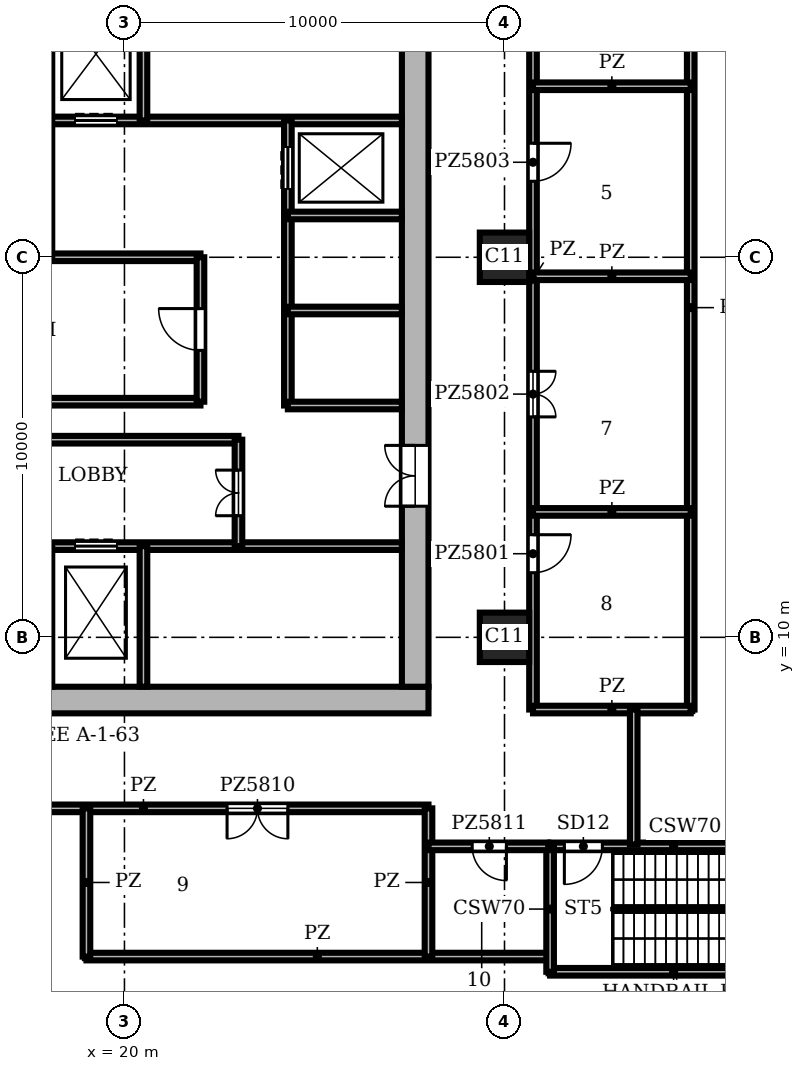
"""IFC4 building model, lengths in metres.
Left out: names, types, materials, properties, quantities, classifications, styles, units other than length and angle.
Written with IfcOpenShell. Run it as: python <this file> out.ifc"""

import sys

from ifc_helpers import new_model, si_unit, direction, frame, frame_2d, origin, origin_2d, place, context, subcontext, project, spatial, rectangle, extrude, element, fill, save


model = new_model("IFC4")
c1 = context("Model", 3, precision=1e-05, world=origin(), true_north=direction((0.0, 1.0)))
c2 = subcontext(c1, "Body", "Model", "MODEL_VIEW")
j1 = project(units=[si_unit("LENGTHUNIT", "METRE"), si_unit("PLANEANGLEUNIT", "RADIAN")], contexts=[c1])
p1 = place(None, origin())
s1 = spatial("IfcSite", under=j1, at=p1, CompositionType="ELEMENT")
p2 = place(p1, origin())
s2 = spatial("IfcBuilding", under=s1, at=p2, CompositionType="ELEMENT")
p3 = place(p2, frame((0.0, 0.0, 237.0)))
s3 = spatial("IfcBuildingStorey", under=s2, at=p3, CompositionType="ELEMENT", Elevation=237.0)
for number, where, z_axis, x_axis in (
    (1, (30.0, 10.0, 0.0), (0.0, 0.0, 1.0), (1.0, 0.0, 0.0)),
    (2, (30.0, 20.0, 0.0), (0.0, 0.0, 1.0), (1.0, 0.0, 0.0)),
):
    element("IfcColumn", number, at=place(p3, frame(where, z_axis=z_axis, x_axis=x_axis)), inside=s3, PredefinedType="COLUMN", context=c2, shape_type="SweptSolid", body=[
        extrude(rectangle(XDim=1.3, YDim=1.3, at=origin_2d()), origin(), (0.0, 0.0, 1.0), 9.0),
    ])
p4 = place(p3, frame((8.0, 8.35, 0.0), z_axis=(0.0, 0.0, 1.0), x_axis=(1.0, 0.0, 0.0)))
e3 = element("IfcWall", 3, at=p4, inside=s3, PredefinedType="SHEAR", context=c2, shape_type="SweptSolid", body=[
    extrude(rectangle(XDim=20.0, YDim=0.7, at=frame_2d((10.0, 0.0))), origin(), (0.0, 0.0, 1.0), 9.0),
])
p5 = place(p3, frame((27.65, 8.7, 0.0), z_axis=(0.0, 0.0, 1.0), x_axis=(0.0, 1.0, 0.0)))
e4 = element("IfcWall", 4, at=p5, inside=s3, PredefinedType="SHEAR", context=c2, shape_type="SweptSolid", body=[
    extrude(rectangle(XDim=18.6, YDim=0.7, at=frame_2d((9.3, 0.0))), origin(), (0.0, 0.0, 1.0), 9.0),
])
p6 = place(p5, frame((4.75, 0.0, 0.0)))
e5 = element("IfcOpeningElement", 5, at=p6, cuts=e4, PredefinedType="OPENING", context=c2, shape_type="SweptSolid", body=[
    extrude(rectangle(XDim=1.6, YDim=2.1, at=frame_2d((0.8, 1.05))), frame((0.0, 0.36, 0.0), z_axis=(0.0, -1.0, 0.0), x_axis=(1.0, 0.0, 0.0)), (0.0, 0.0, 1.0), 0.72),
])
p7 = place(p3, frame((31.2, 1.2, 0.0), z_axis=(0.0, 0.0, 1.0), x_axis=(1.0, 0.0, 0.0)))
e6 = element("IfcWall", 6, at=p7, inside=s3, PredefinedType="SHEAR", context=c2, shape_type="SweptSolid", body=[
    extrude(rectangle(XDim=6.5, YDim=0.2, at=frame_2d((3.25, 0.0))), origin(), (0.0, 0.0, 1.0), 8.55),
])
p8 = place(p3, frame((31.2, 4.5, 0.0), z_axis=(0.0, 0.0, 1.0), x_axis=(1.0, 0.0, 0.0)))
e7 = element("IfcWall", 7, at=p8, inside=s3, PredefinedType="SHEAR", context=c2, shape_type="SweptSolid", body=[
    extrude(rectangle(XDim=6.5, YDim=0.2, at=frame_2d((3.25, 0.0))), origin(), (0.0, 0.0, 1.0), 8.55),
])
p9 = place(p8, frame((0.375, 0.0, 0.0)))
e8 = element("IfcOpeningElement", 8, at=p9, cuts=e7, PredefinedType="OPENING", context=c2, shape_type="SweptSolid", body=[
    extrude(rectangle(XDim=1.0, YDim=2.1, at=frame_2d((0.5, 1.05))), frame((0.0, 0.11, 0.0), z_axis=(0.0, -1.0, 0.0), x_axis=(1.0, 0.0, 0.0)), (0.0, 0.0, 1.0), 0.22),
])
p10 = place(p3, frame((13.8, 12.4, 0.0), z_axis=(0.0, 0.0, 1.0), x_axis=(1.0, 0.0, 0.0)))
e9 = element("IfcWall", 9, at=p10, inside=s3, PredefinedType="SHEAR", context=c2, shape_type="SweptSolid", body=[
    extrude(rectangle(XDim=13.5, YDim=0.2, at=frame_2d((6.75, 0.0))), origin(), (0.0, 0.0, 1.0), 8.55),
])
p11 = place(p10, frame((2.4, 0.0, 0.0)))
e10 = element("IfcOpeningElement", 10, at=p11, cuts=e9, PredefinedType="OPENING", context=c2, shape_type="SweptSolid", body=[
    extrude(rectangle(XDim=1.1, YDim=2.1, at=frame_2d((0.55, 1.05))), frame((0.0, 0.11, 0.0), z_axis=(0.0, -1.0, 0.0), x_axis=(1.0, 0.0, 0.0)), (0.0, 0.0, 1.0), 0.22),
])
p12 = place(p10, frame((4.9, 0.0, 0.0)))
e11 = element("IfcOpeningElement", 11, at=p12, cuts=e9, PredefinedType="OPENING", context=c2, shape_type="SweptSolid", body=[
    extrude(rectangle(XDim=1.1, YDim=2.1, at=frame_2d((0.55, 1.05))), frame((0.0, 0.11, 0.0), z_axis=(0.0, -1.0, 0.0), x_axis=(1.0, 0.0, 0.0)), (0.0, 0.0, 1.0), 0.22),
])
p13 = place(p10, frame((0.2, 0.0, 0.0)))
e12 = element("IfcOpeningElement", 12, at=p13, cuts=e9, PredefinedType="OPENING", context=c2, shape_type="SweptSolid", body=[
    extrude(rectangle(XDim=1.0, YDim=2.1, at=frame_2d((0.5, 1.05))), frame((0.0, 0.11, 0.0), z_axis=(0.0, -1.0, 0.0), x_axis=(1.0, 0.0, 0.0)), (0.0, 0.0, 1.0), 0.22),
])
p14 = place(p3, frame((13.3, 15.2, 0.0), z_axis=(0.0, 0.0, 1.0), x_axis=(1.0, 0.0, 0.0)))
e13 = element("IfcWall", 13, at=p14, inside=s3, PredefinedType="SHEAR", context=c2, shape_type="SweptSolid", body=[
    extrude(rectangle(XDim=9.7, YDim=0.2, at=frame_2d((4.85, 0.0))), origin(), (0.0, 0.0, 1.0), 8.55),
])
p15 = place(p3, frame((24.3, 16.1, 0.0), z_axis=(0.0, 0.0, 1.0), x_axis=(1.0, 0.0, 0.0)))
e14 = element("IfcWall", 14, at=p15, inside=s3, PredefinedType="SHEAR", context=c2, shape_type="SweptSolid", body=[
    extrude(rectangle(XDim=3.0, YDim=0.2, at=frame_2d((1.5, 0.0))), origin(), (0.0, 0.0, 1.0), 8.55),
])
p16 = place(p3, frame((14.0, 16.2, 0.0), z_axis=(0.0, 0.0, 1.0), x_axis=(1.0, 0.0, 0.0)))
e15 = element("IfcWall", 15, at=p16, inside=s3, PredefinedType="SHEAR", context=c2, shape_type="SweptSolid", body=[
    extrude(rectangle(XDim=8.0, YDim=0.2, at=frame_2d((4.0, 0.0))), origin(), (0.0, 0.0, 1.0), 8.55),
])
p17 = place(p3, frame((24.3, 18.6, 0.0), z_axis=(0.0, 0.0, 1.0), x_axis=(1.0, 0.0, 0.0)))
e16 = element("IfcWall", 16, at=p17, inside=s3, PredefinedType="SHEAR", context=c2, shape_type="SweptSolid", body=[
    extrude(rectangle(XDim=3.0, YDim=0.2, at=frame_2d((1.5, 0.0))), origin(), (0.0, 0.0, 1.0), 8.55),
])
p18 = place(p3, frame((13.3, 20.0, 0.0), z_axis=(0.0, 0.0, 1.0), x_axis=(1.0, 0.0, 0.0)))
e17 = element("IfcWall", 17, at=p18, inside=s3, PredefinedType="SHEAR", context=c2, shape_type="SweptSolid", body=[
    extrude(rectangle(XDim=8.7, YDim=0.2, at=frame_2d((4.35, 0.0))), origin(), (0.0, 0.0, 1.0), 8.55),
])
p19 = place(p3, frame((24.3, 21.1, 0.0), z_axis=(0.0, 0.0, 1.0), x_axis=(1.0, 0.0, 0.0)))
e18 = element("IfcWall", 18, at=p19, inside=s3, PredefinedType="SHEAR", context=c2, shape_type="SweptSolid", body=[
    extrude(rectangle(XDim=3.0, YDim=0.2, at=frame_2d((1.5, 0.0))), origin(), (0.0, 0.0, 1.0), 8.55),
])
p20 = place(p3, frame((13.8, 23.6, 0.0), z_axis=(0.0, 0.0, 1.0), x_axis=(1.0, 0.0, 0.0)))
e19 = element("IfcWall", 19, at=p20, inside=s3, PredefinedType="SHEAR", context=c2, shape_type="SweptSolid", body=[
    extrude(rectangle(XDim=13.5, YDim=0.2, at=frame_2d((6.75, 0.0))), origin(), (0.0, 0.0, 1.0), 8.55),
])
p21 = place(p20, frame((2.4, 0.0, 0.0)))
e20 = element("IfcOpeningElement", 20, at=p21, cuts=e19, PredefinedType="OPENING", context=c2, shape_type="SweptSolid", body=[
    extrude(rectangle(XDim=1.1, YDim=2.1, at=frame_2d((0.55, 1.05))), frame((0.0, 0.11, 0.0), z_axis=(0.0, -1.0, 0.0), x_axis=(1.0, 0.0, 0.0)), (0.0, 0.0, 1.0), 0.22),
])
p22 = place(p20, frame((4.9, 0.0, 0.0)))
e21 = element("IfcOpeningElement", 21, at=p22, cuts=e19, PredefinedType="OPENING", context=c2, shape_type="SweptSolid", body=[
    extrude(rectangle(XDim=1.1, YDim=2.1, at=frame_2d((0.55, 1.05))), frame((0.0, 0.11, 0.0), z_axis=(0.0, -1.0, 0.0), x_axis=(1.0, 0.0, 0.0)), (0.0, 0.0, 1.0), 0.22),
])
p23 = place(p20, frame((0.2, 0.0, 0.0)))
e22 = element("IfcOpeningElement", 22, at=p23, cuts=e19, PredefinedType="OPENING", context=c2, shape_type="SweptSolid", body=[
    extrude(rectangle(XDim=1.0, YDim=2.1, at=frame_2d((0.5, 1.05))), frame((0.0, 0.11, 0.0), z_axis=(0.0, -1.0, 0.0), x_axis=(1.0, 0.0, 0.0)), (0.0, 0.0, 1.0), 0.22),
])
for number, where, z_axis, x_axis in (
    (23, (20.5, 8.7, 0.0), (0.0, 0.0, 1.0), (0.0, 1.0, 0.0)),
    (24, (20.5, 23.6, 0.0), (0.0, 0.0, 1.0), (0.0, 1.0, 0.0)),
):
    element("IfcWall", number, at=place(p3, frame(where, z_axis=z_axis, x_axis=x_axis)), inside=s3, PredefinedType="SHEAR", context=c2, shape_type="SweptSolid", body=[
        extrude(rectangle(XDim=3.7, YDim=0.2, at=frame_2d((1.85, 0.0))), origin(), (0.0, 0.0, 1.0), 8.55),
    ])
p24 = place(p3, frame((22.0, 16.2, 0.0), z_axis=(0.0, 0.0, 1.0), x_axis=(0.0, 1.0, 0.0)))
e25 = element("IfcWall", 25, at=p24, inside=s3, PredefinedType="SHEAR", context=c2, shape_type="SweptSolid", body=[
    extrude(rectangle(XDim=3.8, YDim=0.2, at=frame_2d((1.9, 0.0))), origin(), (0.0, 0.0, 1.0), 8.55),
])
p25 = place(p24, frame((1.35, 0.0, 0.0)))
e26 = element("IfcOpeningElement", 26, at=p25, cuts=e25, PredefinedType="OPENING", context=c2, shape_type="SweptSolid", body=[
    extrude(rectangle(XDim=1.1, YDim=2.1, at=frame_2d((0.55, 1.05))), frame((0.0, 0.11, 0.0), z_axis=(0.0, -1.0, 0.0), x_axis=(1.0, 0.0, 0.0)), (0.0, 0.0, 1.0), 0.22),
])
p26 = place(p3, frame((23.0, 12.4, 0.0), z_axis=(0.0, 0.0, 1.0), x_axis=(0.0, 1.0, 0.0)))
e27 = element("IfcWall", 27, at=p26, inside=s3, PredefinedType="SHEAR", context=c2, shape_type="SweptSolid", body=[
    extrude(rectangle(XDim=2.8, YDim=0.2, at=frame_2d((1.4, 0.0))), origin(), (0.0, 0.0, 1.0), 8.55),
])
p27 = place(p26, frame((0.8, 0.0, 0.0)))
e28 = element("IfcOpeningElement", 28, at=p27, cuts=e27, PredefinedType="OPENING", context=c2, shape_type="SweptSolid", body=[
    extrude(rectangle(XDim=1.2, YDim=2.1, at=frame_2d((0.6, 1.05))), frame((0.0, 0.11, 0.0), z_axis=(0.0, -1.0, 0.0), x_axis=(1.0, 0.0, 0.0)), (0.0, 0.0, 1.0), 0.22),
])
p28 = place(p3, frame((24.3, 16.1, 0.0), z_axis=(0.0, 0.0, 1.0), x_axis=(0.0, 1.0, 0.0)))
e29 = element("IfcWall", 29, at=p28, inside=s3, PredefinedType="SHEAR", context=c2, shape_type="SweptSolid", body=[
    extrude(rectangle(XDim=7.5, YDim=0.2, at=frame_2d((3.75, 0.0))), origin(), (0.0, 0.0, 1.0), 8.55),
])
p29 = place(p28, frame((5.7, 0.0, 0.0)))
e30 = element("IfcOpeningElement", 30, at=p29, cuts=e29, PredefinedType="OPENING", context=c2, shape_type="SweptSolid", body=[
    extrude(rectangle(XDim=1.1, YDim=2.1, at=frame_2d((0.55, 1.05))), frame((0.0, 0.11, 0.0), z_axis=(0.0, -1.0, 0.0), x_axis=(1.0, 0.0, 0.0)), (0.0, 0.0, 1.0), 0.22),
])
p30 = place(p3, frame((31.2, 1.2, 0.0), z_axis=(0.0, 0.0, 1.0), x_axis=(0.0, 1.0, 0.0)))
e31 = element("IfcWall", 31, at=p30, inside=s3, PredefinedType="SHEAR", context=c2, shape_type="SweptSolid", body=[
    extrude(rectangle(XDim=3.3, YDim=0.2, at=frame_2d((1.65, 0.0))), origin(), (0.0, 0.0, 1.0), 8.55),
])
p31 = place(p3, frame((13.0, 5.5, 0.0), z_axis=(0.0, 0.0, 1.0), x_axis=(1.0, 0.0, 0.0)))
e32 = element("IfcWall", 32, at=p31, inside=s3, PredefinedType="PARTITIONING", context=c2, shape_type="SweptSolid", body=[
    extrude(rectangle(XDim=15.0, YDim=0.2, at=frame_2d((7.5, 0.0))), origin(), (0.0, 0.0, 1.0), 8.55),
])
p32 = place(p31, frame((9.7, 0.0, 0.0)))
e33 = element("IfcOpeningElement", 33, at=p32, cuts=e32, PredefinedType="OPENING", context=c2, shape_type="SweptSolid", body=[
    extrude(rectangle(XDim=1.6, YDim=2.1, at=frame_2d((0.8, 1.05))), frame((0.0, 0.11, 0.0), z_axis=(0.0, -1.0, 0.0), x_axis=(1.0, 0.0, 0.0)), (0.0, 0.0, 1.0), 0.22),
])
p33 = place(p3, frame((19.0, 1.6, 0.0), z_axis=(0.0, 0.0, 1.0), x_axis=(1.0, 0.0, 0.0)))
e34 = element("IfcWall", 34, at=p33, inside=s3, PredefinedType="PARTITIONING", context=c2, shape_type="SweptSolid", body=[
    extrude(rectangle(XDim=12.15, YDim=0.2, at=frame_2d((6.075, 0.0))), origin(), (0.0, 0.0, 1.0), 8.55),
])
p34 = place(p3, frame((28.0, 4.5, 0.0), z_axis=(0.0, 0.0, 1.0), x_axis=(1.0, 0.0, 0.0)))
e35 = element("IfcWall", 35, at=p34, inside=s3, PredefinedType="PARTITIONING", context=c2, shape_type="SweptSolid", body=[
    extrude(rectangle(XDim=3.15, YDim=0.2, at=frame_2d((1.575, 0.0))), origin(), (0.0, 0.0, 1.0), 8.55),
])
p35 = place(p34, frame((1.15, 0.0, 0.0)))
e36 = element("IfcOpeningElement", 36, at=p35, cuts=e35, PredefinedType="OPENING", context=c2, shape_type="SweptSolid", body=[
    extrude(rectangle(XDim=0.9, YDim=2.1, at=frame_2d((0.45, 1.05))), frame((0.0, 0.11, 0.0), z_axis=(0.0, -1.0, 0.0), x_axis=(1.0, 0.0, 0.0)), (0.0, 0.0, 1.0), 0.22),
])
for number, where, z_axis, x_axis in (
    (37, (30.75, 8.1, 0.0), (0.0, 0.0, 1.0), (1.0, 0.0, 0.0)),
    (38, (30.75, 13.3, 0.0), (0.0, 0.0, 1.0), (1.0, 0.0, 0.0)),
    (39, (30.75, 19.5, 0.0), (0.0, 0.0, 1.0), (1.0, 0.0, 0.0)),
    (40, (30.75, 24.5, 0.0), (0.0, 0.0, 1.0), (1.0, 0.0, 0.0)),
):
    element("IfcWall", number, at=place(p3, frame(where, z_axis=z_axis, x_axis=x_axis)), inside=s3, PredefinedType="PARTITIONING", context=c2, shape_type="SweptSolid", body=[
        extrude(rectangle(XDim=4.15, YDim=0.2, at=frame_2d((2.075, 0.0))), origin(), (0.0, 0.0, 1.0), 8.55),
    ])
for number, where, z_axis, x_axis in (
    (41, (19.0, 1.6, 0.0), (0.0, 0.0, 1.0), (0.0, 1.0, 0.0)),
    (42, (28.0, 1.6, 0.0), (0.0, 0.0, 1.0), (0.0, 1.0, 0.0)),
):
    element("IfcWall", number, at=place(p3, frame(where, z_axis=z_axis, x_axis=x_axis)), inside=s3, PredefinedType="PARTITIONING", context=c2, shape_type="SweptSolid", body=[
        extrude(rectangle(XDim=3.9, YDim=0.2, at=frame_2d((1.95, 0.0))), origin(), (0.0, 0.0, 1.0), 8.55),
    ])
p36 = place(p3, frame((30.75, 8.1, 0.0), z_axis=(0.0, 0.0, 1.0), x_axis=(0.0, 1.0, 0.0)))
e43 = element("IfcWall", 43, at=p36, inside=s3, PredefinedType="PARTITIONING", context=c2, shape_type="SweptSolid", body=[
    extrude(rectangle(XDim=22.65, YDim=0.2, at=frame_2d((11.325, 0.0))), origin(), (0.0, 0.0, 1.0), 8.55),
])
p37 = place(p36, frame((3.6, 0.0, 0.0)))
e44 = element("IfcOpeningElement", 44, at=p37, cuts=e43, PredefinedType="OPENING", context=c2, shape_type="SweptSolid", body=[
    extrude(rectangle(XDim=1.0, YDim=2.1, at=frame_2d((0.5, 1.05))), frame((0.0, 0.11, 0.0), z_axis=(0.0, -1.0, 0.0), x_axis=(1.0, 0.0, 0.0)), (0.0, 0.0, 1.0), 0.22),
])
p38 = place(p36, frame((7.7, 0.0, 0.0)))
e45 = element("IfcOpeningElement", 45, at=p38, cuts=e43, PredefinedType="OPENING", context=c2, shape_type="SweptSolid", body=[
    extrude(rectangle(XDim=1.2, YDim=2.1, at=frame_2d((0.6, 1.05))), frame((0.0, 0.11, 0.0), z_axis=(0.0, -1.0, 0.0), x_axis=(1.0, 0.0, 0.0)), (0.0, 0.0, 1.0), 0.22),
])
p39 = place(p36, frame((13.9, 0.0, 0.0)))
e46 = element("IfcOpeningElement", 46, at=p39, cuts=e43, PredefinedType="OPENING", context=c2, shape_type="SweptSolid", body=[
    extrude(rectangle(XDim=1.0, YDim=2.1, at=frame_2d((0.5, 1.05))), frame((0.0, 0.11, 0.0), z_axis=(0.0, -1.0, 0.0), x_axis=(1.0, 0.0, 0.0)), (0.0, 0.0, 1.0), 0.22),
])
p40 = place(p36, frame((18.4, 0.0, 0.0)))
e47 = element("IfcOpeningElement", 47, at=p40, cuts=e43, PredefinedType="OPENING", context=c2, shape_type="SweptSolid", body=[
    extrude(rectangle(XDim=1.0, YDim=2.1, at=frame_2d((0.5, 1.05))), frame((0.0, 0.11, 0.0), z_axis=(0.0, -1.0, 0.0), x_axis=(1.0, 0.0, 0.0)), (0.0, 0.0, 1.0), 0.22),
])
p41 = place(p3, frame((33.4, 4.55, 0.0), z_axis=(0.0, 0.0, 1.0), x_axis=(0.0, 1.0, 0.0)))
e48 = element("IfcWall", 48, at=p41, inside=s3, PredefinedType="PARTITIONING", context=c2, shape_type="SweptSolid", body=[
    extrude(rectangle(XDim=3.55, YDim=0.2, at=frame_2d((1.775, 0.0))), origin(), (0.0, 0.0, 1.0), 8.55),
])
p42 = place(p3, frame((34.9, 8.1, 0.0), z_axis=(0.0, 0.0, 1.0), x_axis=(0.0, 1.0, 0.0)))
e49 = element("IfcWall", 49, at=p42, inside=s3, PredefinedType="PARTITIONING", context=c2, shape_type="SweptSolid", body=[
    extrude(rectangle(XDim=21.15, YDim=0.2, at=frame_2d((10.575, 0.0))), origin(), (0.0, 0.0, 1.0), 8.55),
])
p43 = place(p29, origin())
e50 = element("IfcDoor", 50, at=p43, inside=s3, OperationType="DOUBLE_DOOR_SLIDING", PredefinedType="DOOR", context=c2, shape_type="SweptSolid", body=[
    extrude(rectangle(XDim=1.1, YDim=2.1, at=frame_2d((0.55, 1.05))), frame((0.0, 0.025, 0.0), z_axis=(0.0, -1.0, 0.0), x_axis=(1.0, 0.0, 0.0)), (0.0, 0.0, 1.0), 0.05),
])
fill(e30, e50)
p44 = place(p12, origin())
e51 = element("IfcDoor", 51, at=p44, inside=s3, OperationType="DOUBLE_DOOR_SLIDING", PredefinedType="DOOR", context=c2, shape_type="SweptSolid", body=[
    extrude(rectangle(XDim=1.1, YDim=2.1, at=frame_2d((0.55, 1.05))), frame((0.0, 0.025, 0.0), z_axis=(0.0, -1.0, 0.0), x_axis=(1.0, 0.0, 0.0)), (0.0, 0.0, 1.0), 0.05),
])
fill(e11, e51)
p45 = place(p22, origin())
e52 = element("IfcDoor", 52, at=p45, inside=s3, OperationType="DOUBLE_DOOR_SLIDING", PredefinedType="DOOR", context=c2, shape_type="SweptSolid", body=[
    extrude(rectangle(XDim=1.1, YDim=2.1, at=frame_2d((0.55, 1.05))), frame((0.0, 0.025, 0.0), z_axis=(0.0, -1.0, 0.0), x_axis=(1.0, 0.0, 0.0)), (0.0, 0.0, 1.0), 0.05),
])
fill(e21, e52)
p46 = place(p9, frame((1.0, 0.0, 0.0), z_axis=(0.0, 0.0, 1.0), x_axis=(-1.0, 0.0, 0.0)))
e53 = element("IfcDoor", 53, at=p46, inside=s3, OperationType="SINGLE_SWING_RIGHT", PredefinedType="DOOR", context=c2, shape_type="SweptSolid", body=[
    extrude(rectangle(XDim=1.0, YDim=2.1, at=frame_2d((0.5, 1.05))), frame((0.0, 0.025, 0.0), z_axis=(0.0, -1.0, 0.0), x_axis=(1.0, 0.0, 0.0)), (0.0, 0.0, 1.0), 0.05),
])
fill(e8, e53)
p47 = place(p27, origin())
e54 = element("IfcDoor", 54, at=p47, inside=s3, OperationType="DOUBLE_DOOR_SINGLE_SWING", PredefinedType="DOOR", context=c2, shape_type="SweptSolid", body=[
    extrude(rectangle(XDim=1.2, YDim=2.1, at=frame_2d((0.6, 1.05))), frame((0.0, 0.025, 0.0), z_axis=(0.0, -1.0, 0.0), x_axis=(1.0, 0.0, 0.0)), (0.0, 0.0, 1.0), 0.05),
])
fill(e28, e54)
p48 = place(p25, origin())
e55 = element("IfcDoor", 55, at=p48, inside=s3, OperationType="SINGLE_SWING_RIGHT", PredefinedType="DOOR", context=c2, shape_type="SweptSolid", body=[
    extrude(rectangle(XDim=1.1, YDim=2.1, at=frame_2d((0.55, 1.05))), frame((0.0, 0.025, 0.0), z_axis=(0.0, -1.0, 0.0), x_axis=(1.0, 0.0, 0.0)), (0.0, 0.0, 1.0), 0.05),
])
fill(e26, e55)
p49 = place(p6, origin())
e56 = element("IfcDoor", 56, at=p49, inside=s3, OperationType="DOUBLE_DOOR_SINGLE_SWING", PredefinedType="DOOR", context=c2, shape_type="SweptSolid", body=[
    extrude(rectangle(XDim=1.6, YDim=2.1, at=frame_2d((0.8, 1.05))), frame((0.0, 0.025, 0.0), z_axis=(0.0, -1.0, 0.0), x_axis=(1.0, 0.0, 0.0)), (0.0, 0.0, 1.0), 0.05),
])
fill(e5, e56)
p50 = place(p37, frame((1.0, 0.0, 0.0), z_axis=(0.0, 0.0, 1.0), x_axis=(-1.0, 0.0, 0.0)))
e57 = element("IfcDoor", 57, at=p50, inside=s3, OperationType="SINGLE_SWING_LEFT", PredefinedType="DOOR", context=c2, shape_type="SweptSolid", body=[
    extrude(rectangle(XDim=1.0, YDim=2.1, at=frame_2d((0.5, 1.05))), frame((0.0, 0.025, 0.0), z_axis=(0.0, -1.0, 0.0), x_axis=(1.0, 0.0, 0.0)), (0.0, 0.0, 1.0), 0.05),
])
fill(e44, e57)
p51 = place(p38, frame((1.2, 0.0, 0.0), z_axis=(0.0, 0.0, 1.0), x_axis=(-1.0, 0.0, 0.0)))
e58 = element("IfcDoor", 58, at=p51, inside=s3, OperationType="DOUBLE_DOOR_SINGLE_SWING", PredefinedType="DOOR", context=c2, shape_type="SweptSolid", body=[
    extrude(rectangle(XDim=1.2, YDim=2.1, at=frame_2d((0.6, 1.05))), frame((0.0, 0.025, 0.0), z_axis=(0.0, -1.0, 0.0), x_axis=(1.0, 0.0, 0.0)), (0.0, 0.0, 1.0), 0.05),
])
fill(e45, e58)
p52 = place(p39, frame((1.0, 0.0, 0.0), z_axis=(0.0, 0.0, 1.0), x_axis=(-1.0, 0.0, 0.0)))
e59 = element("IfcDoor", 59, at=p52, inside=s3, OperationType="SINGLE_SWING_LEFT", PredefinedType="DOOR", context=c2, shape_type="SweptSolid", body=[
    extrude(rectangle(XDim=1.0, YDim=2.1, at=frame_2d((0.5, 1.05))), frame((0.0, 0.025, 0.0), z_axis=(0.0, -1.0, 0.0), x_axis=(1.0, 0.0, 0.0)), (0.0, 0.0, 1.0), 0.05),
])
fill(e46, e59)
p53 = place(p32, frame((1.6, 0.0, 0.0), z_axis=(0.0, 0.0, 1.0), x_axis=(-1.0, 0.0, 0.0)))
e60 = element("IfcDoor", 60, at=p53, inside=s3, OperationType="DOUBLE_DOOR_DOUBLE_SWING", PredefinedType="DOOR", context=c2, shape_type="SweptSolid", body=[
    extrude(rectangle(XDim=1.6, YDim=2.1, at=frame_2d((0.8, 1.05))), frame((0.0, 0.025, 0.0), z_axis=(0.0, -1.0, 0.0), x_axis=(1.0, 0.0, 0.0)), (0.0, 0.0, 1.0), 0.05),
])
fill(e33, e60)
p54 = place(p35, frame((0.9, 0.0, 0.0), z_axis=(0.0, 0.0, 1.0), x_axis=(-1.0, 0.0, 0.0)))
e61 = element("IfcDoor", 61, at=p54, inside=s3, OperationType="SINGLE_SWING_LEFT", PredefinedType="DOOR", context=c2, shape_type="SweptSolid", body=[
    extrude(rectangle(XDim=0.9, YDim=2.1, at=frame_2d((0.45, 1.05))), frame((0.0, 0.025, 0.0), z_axis=(0.0, -1.0, 0.0), x_axis=(1.0, 0.0, 0.0)), (0.0, 0.0, 1.0), 0.05),
])
fill(e36, e61)
save(model, sys.argv[1])
